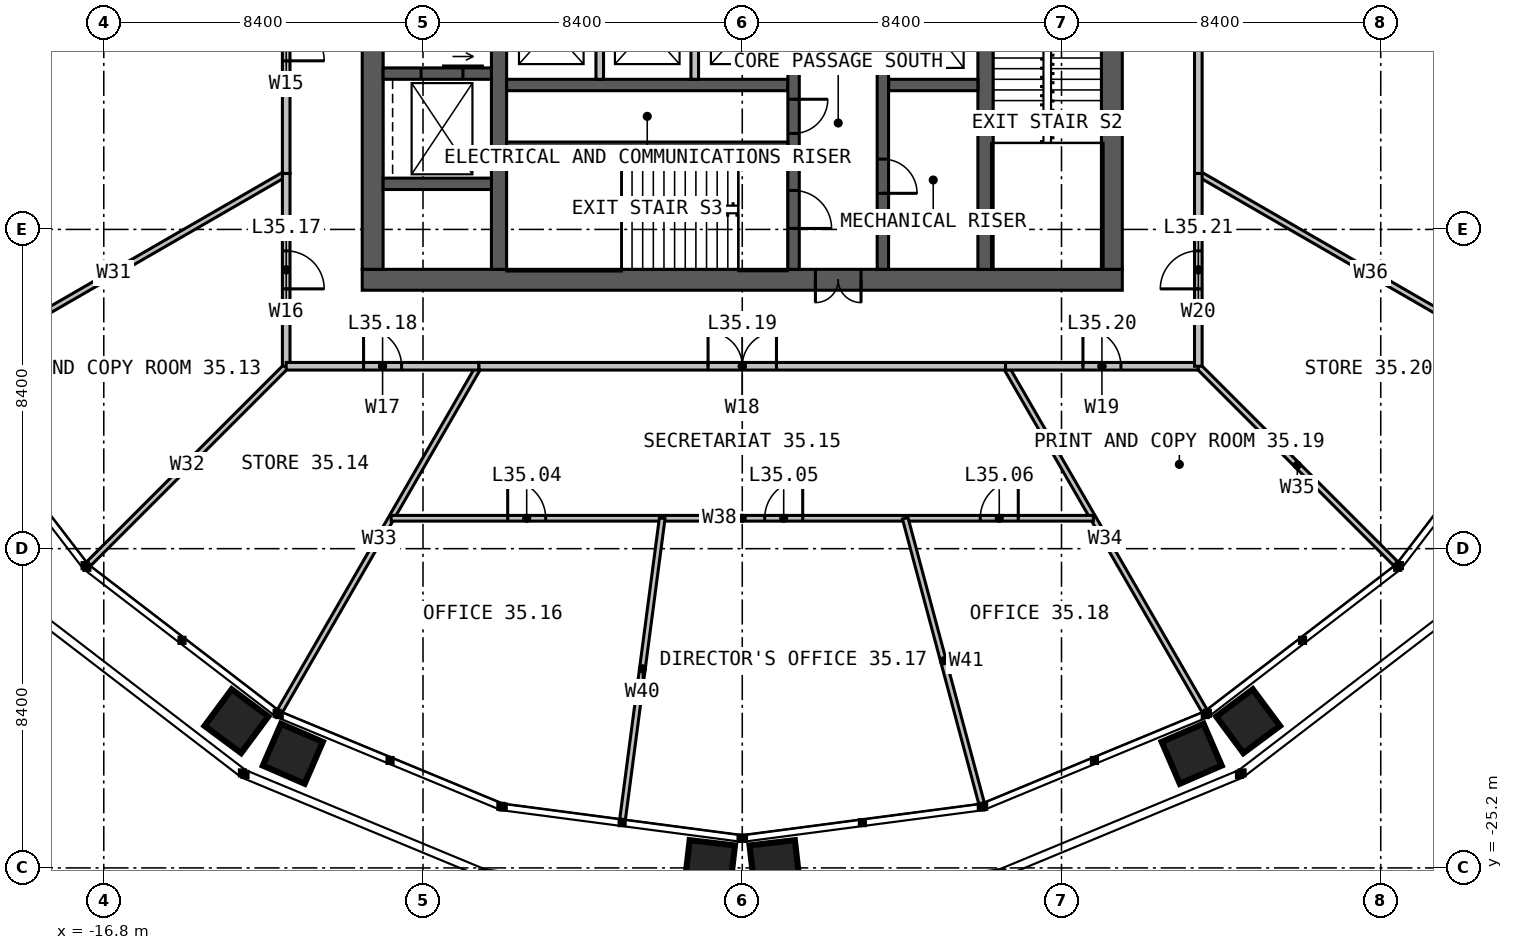
"""IFC4 building model, lengths in metres.
Left out: names, types, materials, properties, quantities, classifications, styles, units other than length and angle.
Written with IfcOpenShell. Run it as: python <this file> out.ifc"""

import sys

from ifc_helpers import new_model, si_unit, direction, frame, frame_2d, origin, place, context, subcontext, project, spatial, rectangle, extrude, element, fill, save


model = new_model("IFC4")
c1 = context("Model", 3, precision=1e-05, world=origin(), true_north=direction((0.0, 1.0)))
c2 = subcontext(c1, "Body", "Model", "MODEL_VIEW")
j1 = project(units=[si_unit("LENGTHUNIT", "METRE"), si_unit("PLANEANGLEUNIT", "RADIAN")], contexts=[c1])
p1 = place(None, origin())
s1 = spatial("IfcSite", under=j1, at=p1, CompositionType="ELEMENT")
p2 = place(p1, origin())
s2 = spatial("IfcBuilding", under=s1, at=p2, CompositionType="ELEMENT")
p3 = place(p2, frame((0.0, 0.0, 146.0)))
s3 = spatial("IfcBuildingStorey", under=s2, at=p3, CompositionType="ELEMENT", Elevation=146.0)
p4 = place(p3, frame((10.0, -9.725, 0.0), z_axis=(0.0, 0.0, 1.0), x_axis=(-1.0, 0.0, 0.0)))
e1 = element("IfcWall", 1, at=p4, inside=s3, PredefinedType="SOLIDWALL", context=c2, shape_type="SweptSolid", body=[
    extrude(rectangle(XDim=20.0, YDim=0.55, at=frame_2d((10.0, 0.0))), origin(), (0.0, 0.0, 1.0), 4.0),
])
p5 = place(p4, frame((6.875, 0.0, 0.0)))
e2 = element("IfcOpeningElement", 2, at=p5, cuts=e1, PredefinedType="OPENING", context=c2, shape_type="SweptSolid", body=[
    extrude(rectangle(XDim=1.2, YDim=2.2, at=frame_2d((0.6, 1.1))), frame((0.0, 0.285, 0.0), z_axis=(0.0, -1.0, 0.0), x_axis=(1.0, 0.0, 0.0)), (0.0, 0.0, 1.0), 0.57),
])
for number, where, z_axis, x_axis in (
    (3, (9.725, -9.45, 0.0), (0.0, 0.0, 1.0), (0.0, 1.0, 0.0)),
    (4, (-9.725, 9.45, 0.0), (0.0, 0.0, 1.0), (0.0, -1.0, 0.0)),
):
    element("IfcWall", number, at=place(p3, frame(where, z_axis=z_axis, x_axis=x_axis)), inside=s3, PredefinedType="SOLIDWALL", context=c2, shape_type="SweptSolid", body=[
        extrude(rectangle(XDim=18.9, YDim=0.55, at=frame_2d((9.45, 0.0))), origin(), (0.0, 0.0, 1.0), 4.0),
    ])
p6 = place(p3, frame((-6.4, -9.45, 0.0), z_axis=(0.0, 0.0, 1.0), x_axis=(0.0, 1.0, 0.0)))
e5 = element("IfcWall", 5, at=p6, inside=s3, PredefinedType="SOLIDWALL", context=c2, shape_type="SweptSolid", body=[
    extrude(rectangle(XDim=18.9, YDim=0.4, at=frame_2d((9.45, 0.0))), origin(), (0.0, 0.0, 1.0), 4.0),
])
p7 = place(p6, frame((8.95, 0.0, 0.0)))
e6 = element("IfcOpeningElement", 6, at=p7, cuts=e5, PredefinedType="OPENING", context=c2, shape_type="SweptSolid", body=[
    extrude(rectangle(XDim=1.0, YDim=2.2, at=frame_2d((0.5, 1.1))), frame((0.0, 0.21, 0.0), z_axis=(0.0, -1.0, 0.0), x_axis=(1.0, 0.0, 0.0)), (0.0, 0.0, 1.0), 0.42),
])
p8 = place(p3, frame((6.4, 9.45, 0.0), z_axis=(0.0, 0.0, 1.0), x_axis=(0.0, -1.0, 0.0)))
e7 = element("IfcWall", 7, at=p8, inside=s3, PredefinedType="SOLIDWALL", context=c2, shape_type="SweptSolid", body=[
    extrude(rectangle(XDim=18.9, YDim=0.4, at=frame_2d((9.45, 0.0))), origin(), (0.0, 0.0, 1.0), 4.0),
])
p9 = place(p8, frame((8.95, 0.0, 0.0)))
e8 = element("IfcOpeningElement", 8, at=p9, cuts=e7, PredefinedType="OPENING", context=c2, shape_type="SweptSolid", body=[
    extrude(rectangle(XDim=1.0, YDim=2.2, at=frame_2d((0.5, 1.1))), frame((0.0, 0.21, 0.0), z_axis=(0.0, -1.0, 0.0), x_axis=(1.0, 0.0, 0.0)), (0.0, 0.0, 1.0), 0.42),
])
p10 = place(p3, frame((-6.2, -4.6, 0.0), z_axis=(0.0, 0.0, 1.0), x_axis=(1.0, 0.0, 0.0)))
e9 = element("IfcWall", 9, at=p10, inside=s3, PredefinedType="SOLIDWALL", context=c2, shape_type="SweptSolid", body=[
    extrude(rectangle(XDim=7.4, YDim=0.3, at=frame_2d((3.7, 0.0))), origin(), (0.0, 0.0, 1.0), 4.0),
])
p11 = place(p3, frame((3.85, -4.6, 0.0), z_axis=(0.0, 0.0, 1.0), x_axis=(1.0, 0.0, 0.0)))
e10 = element("IfcWall", 10, at=p11, inside=s3, PredefinedType="SOLIDWALL", context=c2, shape_type="SweptSolid", body=[
    extrude(rectangle(XDim=2.35, YDim=0.3, at=frame_2d((1.175, 0.0))), origin(), (0.0, 0.0, 1.0), 4.0),
])
p12 = place(p3, frame((1.35, -1.45, 0.0), z_axis=(0.0, 0.0, 1.0), x_axis=(0.0, -1.0, 0.0)))
e11 = element("IfcWall", 11, at=p12, inside=s3, PredefinedType="SOLIDWALL", context=c2, shape_type="SweptSolid", body=[
    extrude(rectangle(XDim=8.0, YDim=0.3, at=frame_2d((4.0, 0.0))), origin(), (0.0, 0.0, 1.0), 4.0),
])
p13 = place(p12, frame((5.925, 0.0, 0.0)))
e12 = element("IfcOpeningElement", 12, at=p13, cuts=e11, PredefinedType="OPENING", context=c2, shape_type="SweptSolid", body=[
    extrude(rectangle(XDim=1.0, YDim=2.2, at=frame_2d((0.5, 1.1))), frame((0.0, 0.16, 0.0), z_axis=(0.0, -1.0, 0.0), x_axis=(1.0, 0.0, 0.0)), (0.0, 0.0, 1.0), 0.32),
])
p14 = place(p12, frame((3.525, 0.0, 0.0)))
e13 = element("IfcOpeningElement", 13, at=p14, cuts=e11, PredefinedType="OPENING", context=c2, shape_type="SweptSolid", body=[
    extrude(rectangle(XDim=0.9, YDim=2.2, at=frame_2d((0.45, 1.1))), frame((0.0, 0.16, 0.0), z_axis=(0.0, -1.0, 0.0), x_axis=(1.0, 0.0, 0.0)), (0.0, 0.0, 1.0), 0.32),
])
p15 = place(p3, frame((3.7, -1.45, 0.0), z_axis=(0.0, 0.0, 1.0), x_axis=(0.0, -1.0, 0.0)))
e14 = element("IfcWall", 14, at=p15, inside=s3, PredefinedType="SOLIDWALL", context=c2, shape_type="SweptSolid", body=[
    extrude(rectangle(XDim=8.0, YDim=0.3, at=frame_2d((4.0, 0.0))), origin(), (0.0, 0.0, 1.0), 4.0),
])
p16 = place(p15, frame((5.1, 0.0, 0.0)))
e15 = element("IfcOpeningElement", 15, at=p16, cuts=e14, PredefinedType="OPENING", context=c2, shape_type="SweptSolid", body=[
    extrude(rectangle(XDim=0.9, YDim=2.2, at=frame_2d((0.45, 1.1))), frame((0.0, 0.16, 0.0), z_axis=(0.0, -1.0, 0.0), x_axis=(1.0, 0.0, 0.0)), (0.0, 0.0, 1.0), 0.32),
])
p17 = place(p3, frame((-6.2, -6.2, 0.0), z_axis=(0.0, 0.0, 1.0), x_axis=(1.0, 0.0, 0.0)))
e16 = element("IfcWall", 16, at=p17, inside=s3, PredefinedType="SOLIDWALL", context=c2, shape_type="SweptSolid", body=[
    extrude(rectangle(XDim=7.4, YDim=0.2, at=frame_2d((3.7, 0.0))), origin(), (0.0, 0.0, 1.0), 4.0),
])
p18 = place(p3, frame((-9.45, -4.3, 0.0), z_axis=(0.0, 0.0, 1.0), x_axis=(1.0, 0.0, 0.0)))
e17 = element("IfcWall", 17, at=p18, inside=s3, PredefinedType="SOLIDWALL", context=c2, shape_type="SweptSolid", body=[
    extrude(rectangle(XDim=2.85, YDim=0.3, at=frame_2d((1.425, 0.0))), origin(), (0.0, 0.0, 1.0), 4.0),
])
p19 = place(p18, frame((1.0, 0.0, 0.0)))
e18 = element("IfcOpeningElement", 18, at=p19, cuts=e17, PredefinedType="OPENING", context=c2, shape_type="SweptSolid", body=[
    extrude(rectangle(XDim=1.1, YDim=2.2, at=frame_2d((0.55, 1.1))), frame((0.0, 0.16, 0.0), z_axis=(0.0, -1.0, 0.0), x_axis=(1.0, 0.0, 0.0)), (0.0, 0.0, 1.0), 0.32),
])
p20 = place(p3, frame((-9.45, -7.2, 0.0), z_axis=(0.0, 0.0, 1.0), x_axis=(1.0, 0.0, 0.0)))
e19 = element("IfcWall", 19, at=p20, inside=s3, PredefinedType="SOLIDWALL", context=c2, shape_type="SweptSolid", body=[
    extrude(rectangle(XDim=2.85, YDim=0.3, at=frame_2d((1.425, 0.0))), origin(), (0.0, 0.0, 1.0), 4.0),
])
for number, where, z_axis, x_axis in (
    (20, (-3.75, -1.75, 0.0), (0.0, 0.0, 1.0), (0.0, -1.0, 0.0)),
    (21, (-1.25, -1.75, 0.0), (0.0, 0.0, 1.0), (0.0, -1.0, 0.0)),
):
    element("IfcWall", number, at=place(p3, frame(where, z_axis=z_axis, x_axis=x_axis)), inside=s3, PredefinedType="SOLIDWALL", context=c2, shape_type="SweptSolid", body=[
        extrude(rectangle(XDim=2.7, YDim=0.2, at=frame_2d((1.35, 0.0))), origin(), (0.0, 0.0, 1.0), 3.75),
    ])
for number, where, z_axis, x_axis in (
    (22, (12.0, -6.928, 0.0), (0.0, 0.0, 1.0), (0.866, -0.5, 0.0)),
    (23, (-12.0, -6.928, 0.0), (0.0, 0.0, 1.0), (-0.866, -0.5, 0.0)),
):
    element("IfcWall", number, at=place(p3, frame(where, z_axis=z_axis, x_axis=x_axis)), inside=s3, PredefinedType="PARTITIONING", context=c2, shape_type="SweptSolid", body=[
        extrude(rectangle(XDim=10.478, YDim=0.15, at=frame_2d((5.239, 0.0))), origin(), (0.0, 0.0, 1.0), 2.79),
    ])
p21 = place(p3, frame((-12.0, -12.0, 0.0), z_axis=(0.0, 0.0, 1.0), x_axis=(-0.707106781187, -0.707106781187, 0.0)))
e24 = element("IfcWall", 24, at=p21, inside=s3, PredefinedType="PARTITIONING", context=c2, shape_type="SweptSolid", body=[
    extrude(rectangle(XDim=7.364, YDim=0.15, at=frame_2d((3.682, 0.0))), origin(), (0.0, 0.0, 1.0), 2.79),
])
for number, where, z_axis, x_axis in (
    (25, (-6.928, -12.0, 0.0), (0.0, 0.0, 1.0), (-0.5, -0.866, 0.0)),
    (26, (6.928, -12.0, 0.0), (0.0, 0.0, 1.0), (0.5, -0.866, 0.0)),
):
    element("IfcWall", number, at=place(p3, frame(where, z_axis=z_axis, x_axis=x_axis)), inside=s3, PredefinedType="PARTITIONING", context=c2, shape_type="SweptSolid", body=[
        extrude(rectangle(XDim=10.478, YDim=0.15, at=frame_2d((5.239, 0.0))), origin(), (0.0, 0.0, 1.0), 2.79),
    ])
p22 = place(p3, frame((12.0, -12.0, 0.0), z_axis=(0.0, 0.0, 1.0), x_axis=(0.707106781187, -0.707106781187, 0.0)))
e27 = element("IfcWall", 27, at=p22, inside=s3, PredefinedType="PARTITIONING", context=c2, shape_type="SweptSolid", body=[
    extrude(rectangle(XDim=7.364, YDim=0.15, at=frame_2d((3.682, 0.0))), origin(), (0.0, 0.0, 1.0), 2.79),
])
p23 = place(p3, frame((12.0, -6.928, 0.0), z_axis=(0.0, 0.0, 1.0), x_axis=(0.0, 1.0, 0.0)))
e28 = element("IfcWall", 28, at=p23, inside=s3, PredefinedType="PARTITIONING", context=c2, shape_type="SweptSolid", body=[
    extrude(rectangle(XDim=10.144, YDim=0.2, at=frame_2d((5.072, 0.0))), origin(), (0.0, 0.0, 1.0), 3.8),
])
p24 = place(p23, frame((4.172, 0.0, 0.0)))
e29 = element("IfcOpeningElement", 29, at=p24, cuts=e28, PredefinedType="OPENING", context=c2, shape_type="SweptSolid", body=[
    extrude(rectangle(XDim=1.8, YDim=2.2, at=frame_2d((0.9, 1.1))), frame((0.0, 0.11, 0.0), z_axis=(0.0, -1.0, 0.0), x_axis=(1.0, 0.0, 0.0)), (0.0, 0.0, 1.0), 0.22),
])
p25 = place(p3, frame((-12.0, 0.0, 0.0), z_axis=(0.0, 0.0, 1.0), x_axis=(0.0, -1.0, 0.0)))
e30 = element("IfcWall", 30, at=p25, inside=s3, PredefinedType="PARTITIONING", context=c2, shape_type="SweptSolid", body=[
    extrude(rectangle(XDim=6.928, YDim=0.2, at=frame_2d((3.464, 0.0))), origin(), (0.0, 0.0, 1.0), 3.8),
])
p26 = place(p25, frame((2.964, 0.0, 0.0)))
e31 = element("IfcOpeningElement", 31, at=p26, cuts=e30, PredefinedType="OPENING", context=c2, shape_type="SweptSolid", body=[
    extrude(rectangle(XDim=1.0, YDim=2.2, at=frame_2d((0.5, 1.1))), frame((0.0, 0.11, 0.0), z_axis=(0.0, -1.0, 0.0), x_axis=(1.0, 0.0, 0.0)), (0.0, 0.0, 1.0), 0.22),
])
p27 = place(p3, frame((-12.0, -6.928, 0.0), z_axis=(0.0, 0.0, 1.0), x_axis=(0.0, -1.0, 0.0)))
e32 = element("IfcWall", 32, at=p27, inside=s3, PredefinedType="PARTITIONING", context=c2, shape_type="SweptSolid", body=[
    extrude(rectangle(XDim=5.072, YDim=0.2, at=frame_2d((2.536, 0.0))), origin(), (0.0, 0.0, 1.0), 3.8),
])
p28 = place(p27, frame((2.036, 0.0, 0.0)))
e33 = element("IfcOpeningElement", 33, at=p28, cuts=e32, PredefinedType="OPENING", context=c2, shape_type="SweptSolid", body=[
    extrude(rectangle(XDim=1.0, YDim=2.2, at=frame_2d((0.5, 1.1))), frame((0.0, 0.11, 0.0), z_axis=(0.0, -1.0, 0.0), x_axis=(1.0, 0.0, 0.0)), (0.0, 0.0, 1.0), 0.22),
])
p29 = place(p3, frame((-12.0, -12.0, 0.0), z_axis=(0.0, 0.0, 1.0), x_axis=(1.0, 0.0, 0.0)))
e34 = element("IfcWall", 34, at=p29, inside=s3, PredefinedType="PARTITIONING", context=c2, shape_type="SweptSolid", body=[
    extrude(rectangle(XDim=5.072, YDim=0.2, at=frame_2d((2.536, 0.0))), origin(), (0.0, 0.0, 1.0), 3.8),
])
p30 = place(p29, frame((2.036, 0.0, 0.0)))
e35 = element("IfcOpeningElement", 35, at=p30, cuts=e34, PredefinedType="OPENING", context=c2, shape_type="SweptSolid", body=[
    extrude(rectangle(XDim=1.0, YDim=2.2, at=frame_2d((0.5, 1.1))), frame((0.0, 0.11, 0.0), z_axis=(0.0, -1.0, 0.0), x_axis=(1.0, 0.0, 0.0)), (0.0, 0.0, 1.0), 0.22),
])
p31 = place(p3, frame((-9.238, -16.0, 0.0), z_axis=(0.0, 0.0, 1.0), x_axis=(1.0, 0.0, 0.0)))
e36 = element("IfcWall", 36, at=p31, inside=s3, PredefinedType="PARTITIONING", context=c2, shape_type="SweptSolid", body=[
    extrude(rectangle(XDim=18.475, YDim=0.15, at=frame_2d((9.238, 0.0))), origin(), (0.0, 0.0, 1.0), 2.79),
])
p32 = place(p31, frame((3.066, 0.0, 0.0)))
e37 = element("IfcOpeningElement", 37, at=p32, cuts=e36, PredefinedType="OPENING", context=c2, shape_type="SweptSolid", body=[
    extrude(rectangle(XDim=1.0, YDim=2.2, at=frame_2d((0.5, 1.1))), frame((0.0, 0.085, 0.0), z_axis=(0.0, -1.0, 0.0), x_axis=(1.0, 0.0, 0.0)), (0.0, 0.0, 1.0), 0.17),
])
p33 = place(p31, frame((9.828, 0.0, 0.0)))
e38 = element("IfcOpeningElement", 38, at=p33, cuts=e36, PredefinedType="OPENING", context=c2, shape_type="SweptSolid", body=[
    extrude(rectangle(XDim=1.0, YDim=2.2, at=frame_2d((0.5, 1.1))), frame((0.0, 0.085, 0.0), z_axis=(0.0, -1.0, 0.0), x_axis=(1.0, 0.0, 0.0)), (0.0, 0.0, 1.0), 0.17),
])
p34 = place(p31, frame((15.5, 0.0, 0.0)))
e39 = element("IfcOpeningElement", 39, at=p34, cuts=e36, PredefinedType="OPENING", context=c2, shape_type="SweptSolid", body=[
    extrude(rectangle(XDim=1.0, YDim=2.2, at=frame_2d((0.5, 1.1))), frame((0.0, 0.085, 0.0), z_axis=(0.0, -1.0, 0.0), x_axis=(1.0, 0.0, 0.0)), (0.0, 0.0, 1.0), 0.17),
])
p35 = place(p3, frame((-2.106, -16.0, 0.0), z_axis=(0.0, 0.0, 1.0), x_axis=(-0.13053594497, -0.991443577351, 0.0)))
e40 = element("IfcWall", 40, at=p35, inside=s3, PredefinedType="PARTITIONING", context=c2, shape_type="SweptSolid", body=[
    extrude(rectangle(XDim=7.988, YDim=0.15, at=frame_2d((3.994, 0.0))), origin(), (0.0, 0.0, 1.0), 2.79),
])
p36 = place(p3, frame((4.287, -16.0, 0.0), z_axis=(0.0, 0.0, 1.0), x_axis=(0.25881827922, -0.965926031506, 0.0)))
e41 = element("IfcWall", 41, at=p36, inside=s3, PredefinedType="PARTITIONING", context=c2, shape_type="SweptSolid", body=[
    extrude(rectangle(XDim=7.77, YDim=0.15, at=frame_2d((3.885, 0.0))), origin(), (0.0, 0.0, 1.0), 2.79),
])
p37 = place(p3, frame((-6.928, -12.0, 0.0), z_axis=(0.0, 0.0, 1.0), x_axis=(1.0, 0.0, 0.0)))
e42 = element("IfcWall", 42, at=p37, inside=s3, PredefinedType="PARTITIONING", context=c2, shape_type="SweptSolid", body=[
    extrude(rectangle(XDim=13.856, YDim=0.2, at=frame_2d((6.928, 0.0))), origin(), (0.0, 0.0, 1.0), 3.8),
])
p38 = place(p37, frame((6.028, 0.0, 0.0)))
e43 = element("IfcOpeningElement", 43, at=p38, cuts=e42, PredefinedType="OPENING", context=c2, shape_type="SweptSolid", body=[
    extrude(rectangle(XDim=1.8, YDim=2.2, at=frame_2d((0.9, 1.1))), frame((0.0, 0.11, 0.0), z_axis=(0.0, -1.0, 0.0), x_axis=(1.0, 0.0, 0.0)), (0.0, 0.0, 1.0), 0.22),
])
p39 = place(p3, frame((6.928, -12.0, 0.0), z_axis=(0.0, 0.0, 1.0), x_axis=(1.0, 0.0, 0.0)))
e44 = element("IfcWall", 44, at=p39, inside=s3, PredefinedType="PARTITIONING", context=c2, shape_type="SweptSolid", body=[
    extrude(rectangle(XDim=5.072, YDim=0.2, at=frame_2d((2.536, 0.0))), origin(), (0.0, 0.0, 1.0), 3.8),
])
p40 = place(p39, frame((2.036, 0.0, 0.0)))
e45 = element("IfcOpeningElement", 45, at=p40, cuts=e44, PredefinedType="OPENING", context=c2, shape_type="SweptSolid", body=[
    extrude(rectangle(XDim=1.0, YDim=2.2, at=frame_2d((0.5, 1.1))), frame((0.0, 0.11, 0.0), z_axis=(0.0, -1.0, 0.0), x_axis=(1.0, 0.0, 0.0)), (0.0, 0.0, 1.0), 0.22),
])
p41 = place(p3, frame((12.0, -12.0, 0.0), z_axis=(0.0, 0.0, 1.0), x_axis=(0.0, 1.0, 0.0)))
e46 = element("IfcWall", 46, at=p41, inside=s3, PredefinedType="PARTITIONING", context=c2, shape_type="SweptSolid", body=[
    extrude(rectangle(XDim=5.072, YDim=0.2, at=frame_2d((2.536, 0.0))), origin(), (0.0, 0.0, 1.0), 3.8),
])
p42 = place(p41, frame((2.036, 0.0, 0.0)))
e47 = element("IfcOpeningElement", 47, at=p42, cuts=e46, PredefinedType="OPENING", context=c2, shape_type="SweptSolid", body=[
    extrude(rectangle(XDim=1.0, YDim=2.2, at=frame_2d((0.5, 1.1))), frame((0.0, 0.11, 0.0), z_axis=(0.0, -1.0, 0.0), x_axis=(1.0, 0.0, 0.0)), (0.0, 0.0, 1.0), 0.22),
])
p43 = place(p5, origin())
e48 = element("IfcDoor", 48, at=p43, inside=s3, OperationType="DOUBLE_DOOR_SINGLE_SWING", PredefinedType="DOOR", context=c2, shape_type="SweptSolid", body=[
    extrude(rectangle(XDim=1.2, YDim=2.2, at=frame_2d((0.6, 1.1))), frame((0.0, 0.025, 0.0), z_axis=(0.0, -1.0, 0.0), x_axis=(1.0, 0.0, 0.0)), (0.0, 0.0, 1.0), 0.05),
])
fill(e2, e48)
p44 = place(p13, origin())
e49 = element("IfcDoor", 49, at=p44, inside=s3, OperationType="SINGLE_SWING_RIGHT", PredefinedType="DOOR", context=c2, shape_type="SweptSolid", body=[
    extrude(rectangle(XDim=1.0, YDim=2.2, at=frame_2d((0.5, 1.1))), frame((0.0, 0.025, 0.0), z_axis=(0.0, -1.0, 0.0), x_axis=(1.0, 0.0, 0.0)), (0.0, 0.0, 1.0), 0.05),
])
fill(e12, e49)
p45 = place(p14, origin())
e50 = element("IfcDoor", 50, at=p45, inside=s3, OperationType="SINGLE_SWING_LEFT", PredefinedType="DOOR", context=c2, shape_type="SweptSolid", body=[
    extrude(rectangle(XDim=0.9, YDim=2.2, at=frame_2d((0.45, 1.1))), frame((0.0, 0.025, 0.0), z_axis=(0.0, -1.0, 0.0), x_axis=(1.0, 0.0, 0.0)), (0.0, 0.0, 1.0), 0.05),
])
fill(e13, e50)
p46 = place(p16, origin())
e51 = element("IfcDoor", 51, at=p46, inside=s3, OperationType="SINGLE_SWING_RIGHT", PredefinedType="DOOR", context=c2, shape_type="SweptSolid", body=[
    extrude(rectangle(XDim=0.9, YDim=2.2, at=frame_2d((0.45, 1.1))), frame((0.0, 0.025, 0.0), z_axis=(0.0, -1.0, 0.0), x_axis=(1.0, 0.0, 0.0)), (0.0, 0.0, 1.0), 0.05),
])
fill(e15, e51)
p47 = place(p19, origin())
e52 = element("IfcDoor", 52, at=p47, inside=s3, OperationType="SLIDING_TO_LEFT", PredefinedType="DOOR", context=c2, shape_type="SweptSolid", body=[
    extrude(rectangle(XDim=1.1, YDim=2.2, at=frame_2d((0.55, 1.1))), frame((0.0, 0.025, 0.0), z_axis=(0.0, -1.0, 0.0), x_axis=(1.0, 0.0, 0.0)), (0.0, 0.0, 1.0), 0.05),
])
fill(e18, e52)
p48 = place(p26, origin())
e53 = element("IfcDoor", 53, at=p48, inside=s3, OperationType="SINGLE_SWING_RIGHT", PredefinedType="DOOR", context=c2, shape_type="SweptSolid", body=[
    extrude(rectangle(XDim=1.0, YDim=2.2, at=frame_2d((0.5, 1.1))), frame((0.0, 0.025, 0.0), z_axis=(0.0, -1.0, 0.0), x_axis=(1.0, 0.0, 0.0)), (0.0, 0.0, 1.0), 0.05),
])
fill(e31, e53)
p49 = place(p28, origin())
e54 = element("IfcDoor", 54, at=p49, inside=s3, OperationType="SINGLE_SWING_RIGHT", PredefinedType="DOOR", context=c2, shape_type="SweptSolid", body=[
    extrude(rectangle(XDim=1.0, YDim=2.2, at=frame_2d((0.5, 1.1))), frame((0.0, 0.025, 0.0), z_axis=(0.0, -1.0, 0.0), x_axis=(1.0, 0.0, 0.0)), (0.0, 0.0, 1.0), 0.05),
])
fill(e33, e54)
p50 = place(p30, origin())
e55 = element("IfcDoor", 55, at=p50, inside=s3, OperationType="SINGLE_SWING_LEFT", PredefinedType="DOOR", context=c2, shape_type="SweptSolid", body=[
    extrude(rectangle(XDim=1.0, YDim=2.2, at=frame_2d((0.5, 1.1))), frame((0.0, 0.025, 0.0), z_axis=(0.0, -1.0, 0.0), x_axis=(1.0, 0.0, 0.0)), (0.0, 0.0, 1.0), 0.05),
])
fill(e35, e55)
p51 = place(p32, origin())
e56 = element("IfcDoor", 56, at=p51, inside=s3, OperationType="SINGLE_SWING_LEFT", PredefinedType="DOOR", context=c2, shape_type="SweptSolid", body=[
    extrude(rectangle(XDim=1.0, YDim=2.2, at=frame_2d((0.5, 1.1))), frame((0.0, 0.025, 0.0), z_axis=(0.0, -1.0, 0.0), x_axis=(1.0, 0.0, 0.0)), (0.0, 0.0, 1.0), 0.05),
])
fill(e37, e56)
p52 = place(p33, origin())
e57 = element("IfcDoor", 57, at=p52, inside=s3, OperationType="SINGLE_SWING_RIGHT", PredefinedType="DOOR", context=c2, shape_type="SweptSolid", body=[
    extrude(rectangle(XDim=1.0, YDim=2.2, at=frame_2d((0.5, 1.1))), frame((0.0, 0.025, 0.0), z_axis=(0.0, -1.0, 0.0), x_axis=(1.0, 0.0, 0.0)), (0.0, 0.0, 1.0), 0.05),
])
fill(e38, e57)
p53 = place(p34, origin())
e58 = element("IfcDoor", 58, at=p53, inside=s3, OperationType="SINGLE_SWING_RIGHT", PredefinedType="DOOR", context=c2, shape_type="SweptSolid", body=[
    extrude(rectangle(XDim=1.0, YDim=2.2, at=frame_2d((0.5, 1.1))), frame((0.0, 0.025, 0.0), z_axis=(0.0, -1.0, 0.0), x_axis=(1.0, 0.0, 0.0)), (0.0, 0.0, 1.0), 0.05),
])
fill(e39, e58)
p54 = place(p38, origin())
e59 = element("IfcDoor", 59, at=p54, inside=s3, OperationType="DOUBLE_DOOR_SINGLE_SWING", PredefinedType="DOOR", context=c2, shape_type="SweptSolid", body=[
    extrude(rectangle(XDim=1.8, YDim=2.2, at=frame_2d((0.9, 1.1))), frame((0.0, 0.025, 0.0), z_axis=(0.0, -1.0, 0.0), x_axis=(1.0, 0.0, 0.0)), (0.0, 0.0, 1.0), 0.05),
])
fill(e43, e59)
p55 = place(p40, origin())
e60 = element("IfcDoor", 60, at=p55, inside=s3, OperationType="SINGLE_SWING_LEFT", PredefinedType="DOOR", context=c2, shape_type="SweptSolid", body=[
    extrude(rectangle(XDim=1.0, YDim=2.2, at=frame_2d((0.5, 1.1))), frame((0.0, 0.025, 0.0), z_axis=(0.0, -1.0, 0.0), x_axis=(1.0, 0.0, 0.0)), (0.0, 0.0, 1.0), 0.05),
])
fill(e45, e60)
p56 = place(p42, origin())
e61 = element("IfcDoor", 61, at=p56, inside=s3, OperationType="SINGLE_SWING_LEFT", PredefinedType="DOOR", context=c2, shape_type="SweptSolid", body=[
    extrude(rectangle(XDim=1.0, YDim=2.2, at=frame_2d((0.5, 1.1))), frame((0.0, 0.025, 0.0), z_axis=(0.0, -1.0, 0.0), x_axis=(1.0, 0.0, 0.0)), (0.0, 0.0, 1.0), 0.05),
])
fill(e47, e61)
save(model, sys.argv[1])
